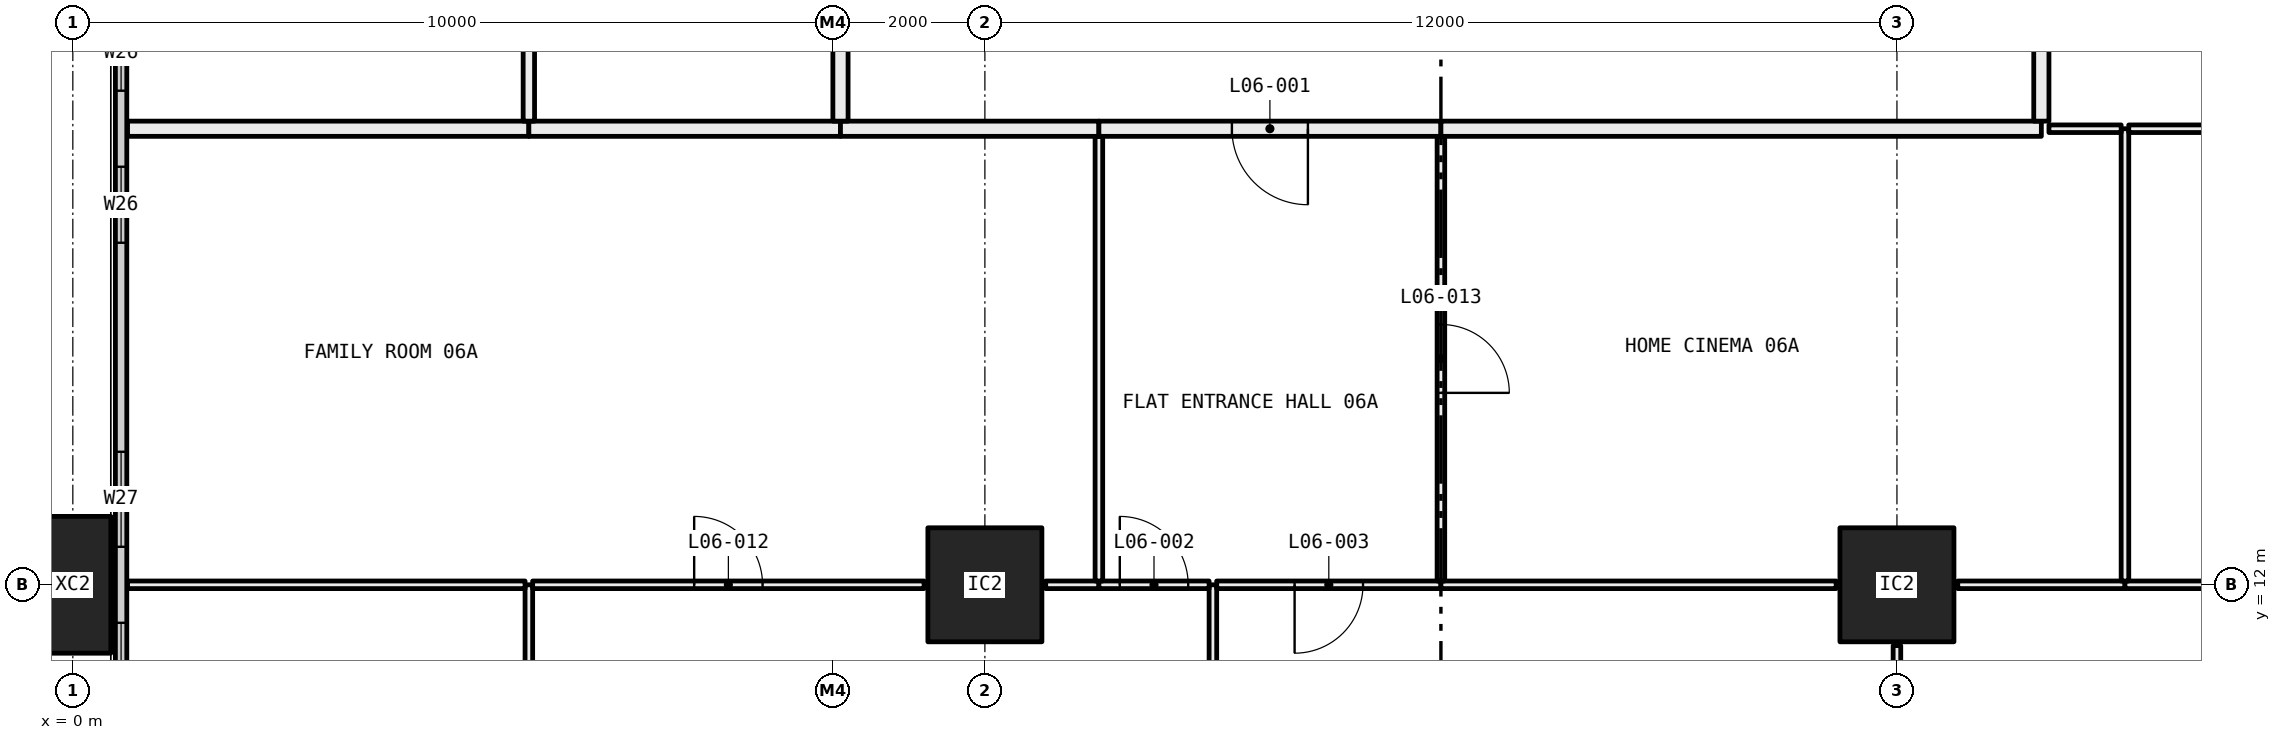
"""IFC4 building model, lengths in metres.
Left out: names, types, materials, properties, quantities, classifications, styles, units other than length and angle.
Written with IfcOpenShell. Run it as: python <this file> out.ifc"""

import sys

from ifc_helpers import new_model, si_unit, direction, frame, frame_2d, origin, origin_2d, place, context, subcontext, project, spatial, rectangle, hollow_rectangle, extrude, element, fill, save


model = new_model("IFC4")
c1 = context("Model", 3, precision=1e-05, world=origin(), true_north=direction((0.0, 1.0)))
c2 = subcontext(c1, "Body", "Model", "MODEL_VIEW")
j1 = project(units=[si_unit("LENGTHUNIT", "METRE"), si_unit("PLANEANGLEUNIT", "RADIAN")], contexts=[c1])
p1 = place(None, origin())
s1 = spatial("IfcSite", under=j1, at=p1, CompositionType="ELEMENT")
p2 = place(p1, origin())
s2 = spatial("IfcBuilding", under=s1, at=p2, CompositionType="ELEMENT")
p3 = place(p2, frame((0.0, 0.0, 33.45)))
s3 = spatial("IfcBuildingStorey", under=s2, at=p3, CompositionType="ELEMENT", Elevation=33.45)
p4 = place(p3, frame((0.0, 12.0, -0.4), z_axis=(0.0, 0.0, 1.0), x_axis=(0.0, 1.0, 0.0)))
e1 = element("IfcColumn", 1, at=p4, inside=s3, PredefinedType="COLUMN", context=c2, shape_type="SweptSolid", body=[
    extrude(hollow_rectangle(XDim=1.8, YDim=1.0, WallThickness=0.07, at=origin_2d()), origin(), (0.0, 0.0, 1.0), 3.45),
])
for number, where, z_axis, x_axis in (
    (2, (12.0, 12.0, 0.0), (0.0, 0.0, 1.0), (1.0, 0.0, 0.0)),
    (3, (24.0, 12.0, 0.0), (0.0, 0.0, 1.0), (1.0, 0.0, 0.0)),
):
    element("IfcColumn", number, at=place(p3, frame(where, z_axis=z_axis, x_axis=x_axis)), inside=s3, PredefinedType="COLUMN", context=c2, shape_type="SweptSolid", body=[
        extrude(hollow_rectangle(XDim=1.5, YDim=1.5, WallThickness=0.065, at=origin_2d()), origin(), (0.0, 0.0, 1.0), 3.05),
    ])
p5 = place(p3, frame((0.635, 6.71, 0.0), z_axis=(0.0, 0.0, 1.0), x_axis=(0.0, 1.0, 0.0)))
e4 = element("IfcWall", 4, at=p5, inside=s3, PredefinedType="ELEMENTEDWALL", context=c2, shape_type="SweptSolid", body=[
    extrude(rectangle(XDim=34.58, YDim=0.15, at=frame_2d((17.29, 0.0))), origin(), (0.0, 0.0, 1.0), 3.05),
])
p6 = place(p5, frame((0.29, 0.0, 0.45)))
e5 = element("IfcOpeningElement", 5, at=p6, cuts=e4, PredefinedType="OPENING", context=c2, shape_type="SweptSolid", body=[
    extrude(rectangle(XDim=4.5, YDim=2.55, at=frame_2d((2.25, 1.275))), frame((0.0, 0.085, 0.0), z_axis=(0.0, -1.0, 0.0), x_axis=(1.0, 0.0, 0.0)), (0.0, 0.0, 1.0), 0.17),
])
p7 = place(p5, frame((5.79, 0.0, 0.45)))
e6 = element("IfcOpeningElement", 6, at=p7, cuts=e4, PredefinedType="OPENING", context=c2, shape_type="SweptSolid", body=[
    extrude(rectangle(XDim=1.25, YDim=2.55, at=frame_2d((0.625, 1.275))), frame((0.0, 0.085, 0.0), z_axis=(0.0, -1.0, 0.0), x_axis=(1.0, 0.0, 0.0)), (0.0, 0.0, 1.0), 0.17),
])
p8 = place(p5, frame((9.79, 0.0, 0.45)))
e7 = element("IfcOpeningElement", 7, at=p8, cuts=e4, PredefinedType="OPENING", context=c2, shape_type="SweptSolid", body=[
    extrude(rectangle(XDim=1.0, YDim=2.55, at=frame_2d((0.5, 1.275))), frame((0.0, 0.085, 0.0), z_axis=(0.0, -1.0, 0.0), x_axis=(1.0, 0.0, 0.0)), (0.0, 0.0, 1.0), 0.17),
])
p9 = place(p5, frame((11.79, 0.0, 0.45)))
e8 = element("IfcOpeningElement", 8, at=p9, cuts=e4, PredefinedType="OPENING", context=c2, shape_type="SweptSolid", body=[
    extrude(rectangle(XDim=1.0, YDim=2.55, at=frame_2d((0.5, 1.275))), frame((0.0, 0.085, 0.0), z_axis=(0.0, -1.0, 0.0), x_axis=(1.0, 0.0, 0.0)), (0.0, 0.0, 1.0), 0.17),
])
p10 = place(p5, frame((15.54, 0.0, 0.45)))
e9 = element("IfcOpeningElement", 9, at=p10, cuts=e4, PredefinedType="OPENING", context=c2, shape_type="SweptSolid", body=[
    extrude(rectangle(XDim=1.25, YDim=2.55, at=frame_2d((0.625, 1.275))), frame((0.0, 0.085, 0.0), z_axis=(0.0, -1.0, 0.0), x_axis=(1.0, 0.0, 0.0)), (0.0, 0.0, 1.0), 0.17),
])
p11 = place(p5, frame((17.79, 0.0, 0.45)))
e10 = element("IfcOpeningElement", 10, at=p11, cuts=e4, PredefinedType="OPENING", context=c2, shape_type="SweptSolid", body=[
    extrude(rectangle(XDim=1.25, YDim=2.55, at=frame_2d((0.625, 1.275))), frame((0.0, 0.085, 0.0), z_axis=(0.0, -1.0, 0.0), x_axis=(1.0, 0.0, 0.0)), (0.0, 0.0, 1.0), 0.17),
])
p12 = place(p5, frame((21.79, 0.0, 0.45)))
e11 = element("IfcOpeningElement", 11, at=p12, cuts=e4, PredefinedType="OPENING", context=c2, shape_type="SweptSolid", body=[
    extrude(rectangle(XDim=1.0, YDim=2.55, at=frame_2d((0.5, 1.275))), frame((0.0, 0.085, 0.0), z_axis=(0.0, -1.0, 0.0), x_axis=(1.0, 0.0, 0.0)), (0.0, 0.0, 1.0), 0.17),
])
p13 = place(p5, frame((23.79, 0.0, 0.45)))
e12 = element("IfcOpeningElement", 12, at=p13, cuts=e4, PredefinedType="OPENING", context=c2, shape_type="SweptSolid", body=[
    extrude(rectangle(XDim=1.0, YDim=2.55, at=frame_2d((0.5, 1.275))), frame((0.0, 0.085, 0.0), z_axis=(0.0, -1.0, 0.0), x_axis=(1.0, 0.0, 0.0)), (0.0, 0.0, 1.0), 0.17),
])
p14 = place(p5, frame((27.54, 0.0, 0.45)))
e13 = element("IfcOpeningElement", 13, at=p14, cuts=e4, PredefinedType="OPENING", context=c2, shape_type="SweptSolid", body=[
    extrude(rectangle(XDim=1.25, YDim=2.55, at=frame_2d((0.625, 1.275))), frame((0.0, 0.085, 0.0), z_axis=(0.0, -1.0, 0.0), x_axis=(1.0, 0.0, 0.0)), (0.0, 0.0, 1.0), 0.17),
])
p15 = place(p5, frame((29.79, 0.0, 0.45)))
e14 = element("IfcOpeningElement", 14, at=p15, cuts=e4, PredefinedType="OPENING", context=c2, shape_type="SweptSolid", body=[
    extrude(rectangle(XDim=4.5, YDim=2.55, at=frame_2d((2.25, 1.275))), frame((0.0, 0.085, 0.0), z_axis=(0.0, -1.0, 0.0), x_axis=(1.0, 0.0, 0.0)), (0.0, 0.0, 1.0), 0.17),
])
p16 = place(p3, frame((6.0, 6.72, 0.0), z_axis=(0.0, 0.0, 1.0), x_axis=(0.0, 1.0, 0.0)))
e15 = element("IfcWall", 15, at=p16, inside=s3, PredefinedType="PARTITIONING", context=c2, shape_type="SweptSolid", body=[
    extrude(rectangle(XDim=5.28, YDim=0.1, at=frame_2d((2.64, 0.0))), origin(), (0.0, 0.0, 1.0), 2.45),
])
p17 = place(p16, frame((2.19, 0.0, 0.0)))
e16 = element("IfcOpeningElement", 16, at=p17, cuts=e15, PredefinedType="OPENING", context=c2, shape_type="SweptSolid", body=[
    extrude(rectangle(XDim=0.9, YDim=2.1, at=frame_2d((0.45, 1.05))), frame((0.0, 0.06, 0.0), z_axis=(0.0, -1.0, 0.0), x_axis=(1.0, 0.0, 0.0)), (0.0, 0.0, 1.0), 0.12),
])
p18 = place(p3, frame((5.95, 12.0, 0.0), z_axis=(0.0, 0.0, 1.0), x_axis=(-1.0, 0.0, 0.0)))
e17 = element("IfcWall", 17, at=p18, inside=s3, PredefinedType="PARTITIONING", context=c2, shape_type="SweptSolid", body=[
    extrude(rectangle(XDim=5.23, YDim=0.1, at=frame_2d((2.615, 0.0))), origin(), (0.0, 0.0, 1.0), 2.45),
])
p19 = place(p3, frame((15.0, 6.05, 0.0), z_axis=(0.0, 0.0, 1.0), x_axis=(0.0, 1.0, 0.0)))
e18 = element("IfcWall", 18, at=p19, inside=s3, PredefinedType="PARTITIONING", context=c2, shape_type="SweptSolid", body=[
    extrude(rectangle(XDim=5.95, YDim=0.1, at=frame_2d((2.975, 0.0))), origin(), (0.0, 0.0, 1.0), 2.45),
])
p20 = place(p3, frame((11.2, 12.0, 0.0), z_axis=(0.0, 0.0, 1.0), x_axis=(-1.0, 0.0, 0.0)))
e19 = element("IfcWall", 19, at=p20, inside=s3, PredefinedType="PARTITIONING", context=c2, shape_type="SweptSolid", body=[
    extrude(rectangle(XDim=5.15, YDim=0.1, at=frame_2d((2.575, 0.0))), origin(), (0.0, 0.0, 1.0), 2.45),
])
p21 = place(p20, frame((2.125, 0.0, 0.0)))
e20 = element("IfcOpeningElement", 20, at=p21, cuts=e19, PredefinedType="OPENING", context=c2, shape_type="SweptSolid", body=[
    extrude(rectangle(XDim=0.9, YDim=2.1, at=frame_2d((0.45, 1.05))), frame((0.0, 0.06, 0.0), z_axis=(0.0, -1.0, 0.0), x_axis=(1.0, 0.0, 0.0)), (0.0, 0.0, 1.0), 0.12),
])
p22 = place(p3, frame((13.5, 12.0, 0.0), z_axis=(0.0, 0.0, 1.0), x_axis=(-1.0, 0.0, 0.0)))
e21 = element("IfcWall", 21, at=p22, inside=s3, PredefinedType="PARTITIONING", context=c2, shape_type="SweptSolid", body=[
    extrude(rectangle(XDim=0.7, YDim=0.1, at=frame_2d((0.35, 0.0))), origin(), (0.0, 0.0, 1.0), 2.45),
])
p23 = place(p3, frame((14.95, 12.0, 0.0), z_axis=(0.0, 0.0, 1.0), x_axis=(-1.0, 0.0, 0.0)))
e22 = element("IfcWall", 22, at=p23, inside=s3, PredefinedType="PARTITIONING", context=c2, shape_type="SweptSolid", body=[
    extrude(rectangle(XDim=1.45, YDim=0.1, at=frame_2d((0.725, 0.0))), origin(), (0.0, 0.0, 1.0), 2.45),
])
p24 = place(p23, frame((0.275, 0.0, 0.0)))
e23 = element("IfcOpeningElement", 23, at=p24, cuts=e22, PredefinedType="OPENING", context=c2, shape_type="SweptSolid", body=[
    extrude(rectangle(XDim=0.9, YDim=2.1, at=frame_2d((0.45, 1.05))), frame((0.0, 0.06, 0.0), z_axis=(0.0, -1.0, 0.0), x_axis=(1.0, 0.0, 0.0)), (0.0, 0.0, 1.0), 0.12),
])
p25 = place(p3, frame((24.0, 6.05, 0.0), z_axis=(0.0, 0.0, 1.0), x_axis=(0.0, 1.0, 0.0)))
e24 = element("IfcWall", 24, at=p25, inside=s3, PredefinedType="PARTITIONING", context=c2, shape_type="SweptSolid", body=[
    extrude(rectangle(XDim=5.15, YDim=0.1, at=frame_2d((2.575, 0.0))), origin(), (0.0, 0.0, 1.0), 2.45),
])
p26 = place(p25, frame((2.125, 0.0, 0.0)))
e25 = element("IfcOpeningElement", 25, at=p26, cuts=e24, PredefinedType="OPENING", context=c2, shape_type="SweptSolid", body=[
    extrude(rectangle(XDim=0.9, YDim=2.1, at=frame_2d((0.45, 1.05))), frame((0.0, 0.06, 0.0), z_axis=(0.0, -1.0, 0.0), x_axis=(1.0, 0.0, 0.0)), (0.0, 0.0, 1.0), 0.12),
])
p27 = place(p3, frame((18.0, 12.0, 0.0), z_axis=(0.0, 0.0, 1.0), x_axis=(-1.0, 0.0, 0.0)))
e26 = element("IfcWall", 26, at=p27, inside=s3, PredefinedType="PARTITIONING", context=c2, shape_type="SweptSolid", body=[
    extrude(rectangle(XDim=2.95, YDim=0.1, at=frame_2d((1.475, 0.0))), origin(), (0.0, 0.0, 1.0), 2.45),
])
p28 = place(p27, frame((1.025, 0.0, 0.0)))
e27 = element("IfcOpeningElement", 27, at=p28, cuts=e26, PredefinedType="OPENING", context=c2, shape_type="SweptSolid", body=[
    extrude(rectangle(XDim=0.9, YDim=2.1, at=frame_2d((0.45, 1.05))), frame((0.0, 0.06, 0.0), z_axis=(0.0, -1.0, 0.0), x_axis=(1.0, 0.0, 0.0)), (0.0, 0.0, 1.0), 0.12),
])
p29 = place(p3, frame((23.2, 12.0, 0.0), z_axis=(0.0, 0.0, 1.0), x_axis=(-1.0, 0.0, 0.0)))
e28 = element("IfcWall", 28, at=p29, inside=s3, PredefinedType="PARTITIONING", context=c2, shape_type="SweptSolid", body=[
    extrude(rectangle(XDim=5.2, YDim=0.1, at=frame_2d((2.6, 0.0))), origin(), (0.0, 0.0, 1.0), 2.45),
])
p30 = place(p3, frame((27.0, 12.0, 0.0), z_axis=(0.0, 0.0, 1.0), x_axis=(-1.0, 0.0, 0.0)))
e29 = element("IfcWall", 29, at=p30, inside=s3, PredefinedType="PARTITIONING", context=c2, shape_type="SweptSolid", body=[
    extrude(rectangle(XDim=2.2, YDim=0.1, at=frame_2d((1.1, 0.0))), origin(), (0.0, 0.0, 1.0), 2.45),
])
p31 = place(p3, frame((32.95, 12.0, 0.0), z_axis=(0.0, 0.0, 1.0), x_axis=(-1.0, 0.0, 0.0)))
e30 = element("IfcWall", 30, at=p31, inside=s3, PredefinedType="PARTITIONING", context=c2, shape_type="SweptSolid", body=[
    extrude(rectangle(XDim=5.95, YDim=0.1, at=frame_2d((2.975, 0.0))), origin(), (0.0, 0.0, 1.0), 2.45),
])
p32 = place(p31, frame((2.525, 0.0, 0.0)))
e31 = element("IfcOpeningElement", 31, at=p32, cuts=e30, PredefinedType="OPENING", context=c2, shape_type="SweptSolid", body=[
    extrude(rectangle(XDim=0.9, YDim=2.1, at=frame_2d((0.45, 1.05))), frame((0.0, 0.06, 0.0), z_axis=(0.0, -1.0, 0.0), x_axis=(1.0, 0.0, 0.0)), (0.0, 0.0, 1.0), 0.12),
])
p33 = place(p3, frame((13.5, 12.05, 0.0), z_axis=(0.0, 0.0, 1.0), x_axis=(0.0, 1.0, 0.0)))
e32 = element("IfcWall", 32, at=p33, inside=s3, PredefinedType="PARTITIONING", context=c2, shape_type="SweptSolid", body=[
    extrude(rectangle(XDim=5.85, YDim=0.1, at=frame_2d((2.925, 0.0))), origin(), (0.0, 0.0, 1.0), 2.45),
])
p34 = place(p3, frame((6.0, 18.0, 0.0), z_axis=(0.0, 0.0, 1.0), x_axis=(-1.0, 0.0, 0.0)))
e33 = element("IfcWall", 33, at=p34, inside=s3, PredefinedType="PARTITIONING", context=c2, shape_type="SweptSolid", body=[
    extrude(rectangle(XDim=5.28, YDim=0.2, at=frame_2d((2.64, 0.0))), origin(), (0.0, 0.0, 1.0), 3.05),
])
p35 = place(p3, frame((10.1, 18.0, 0.0), z_axis=(0.0, 0.0, 1.0), x_axis=(-1.0, 0.0, 0.0)))
e34 = element("IfcWall", 34, at=p35, inside=s3, PredefinedType="PARTITIONING", context=c2, shape_type="SweptSolid", body=[
    extrude(rectangle(XDim=4.1, YDim=0.2, at=frame_2d((2.05, 0.0))), origin(), (0.0, 0.0, 1.0), 3.05),
])
p36 = place(p3, frame((13.5, 18.0, 0.0), z_axis=(0.0, 0.0, 1.0), x_axis=(-1.0, 0.0, 0.0)))
e35 = element("IfcWall", 35, at=p36, inside=s3, PredefinedType="PARTITIONING", context=c2, shape_type="SweptSolid", body=[
    extrude(rectangle(XDim=3.4, YDim=0.2, at=frame_2d((1.7, 0.0))), origin(), (0.0, 0.0, 1.0), 3.05),
])
p37 = place(p3, frame((18.0, 12.05, 0.0), z_axis=(0.0, 0.0, 1.0), x_axis=(0.0, 1.0, 0.0)))
e36 = element("IfcWall", 36, at=p37, inside=s3, PredefinedType="PARTITIONING", context=c2, shape_type="SweptSolid", body=[
    extrude(rectangle(XDim=5.85, YDim=0.1, at=frame_2d((2.925, 0.0))), origin(), (0.0, 0.0, 1.0), 2.45),
])
p38 = place(p37, frame((2.475, 0.0, 0.0)))
e37 = element("IfcOpeningElement", 37, at=p38, cuts=e36, PredefinedType="OPENING", context=c2, shape_type="SweptSolid", body=[
    extrude(rectangle(XDim=0.9, YDim=2.1, at=frame_2d((0.45, 1.05))), frame((0.0, 0.06, 0.0), z_axis=(0.0, -1.0, 0.0), x_axis=(1.0, 0.0, 0.0)), (0.0, 0.0, 1.0), 0.12),
])
p39 = place(p3, frame((18.0, 18.0, 0.0), z_axis=(0.0, 0.0, 1.0), x_axis=(-1.0, 0.0, 0.0)))
e38 = element("IfcWall", 38, at=p39, inside=s3, PredefinedType="PARTITIONING", context=c2, shape_type="SweptSolid", body=[
    extrude(rectangle(XDim=4.5, YDim=0.2, at=frame_2d((2.25, 0.0))), origin(), (0.0, 0.0, 1.0), 3.05),
])
p40 = place(p39, frame((1.75, 0.0, 0.0)))
e39 = element("IfcOpeningElement", 39, at=p40, cuts=e38, PredefinedType="OPENING", context=c2, shape_type="SweptSolid", body=[
    extrude(rectangle(XDim=1.0, YDim=2.1, at=frame_2d((0.5, 1.05))), frame((0.0, 0.11, 0.0), z_axis=(0.0, -1.0, 0.0), x_axis=(1.0, 0.0, 0.0)), (0.0, 0.0, 1.0), 0.22),
])
p41 = place(p3, frame((27.0, 12.05, 0.0), z_axis=(0.0, 0.0, 1.0), x_axis=(0.0, 1.0, 0.0)))
e40 = element("IfcWall", 40, at=p41, inside=s3, PredefinedType="PARTITIONING", context=c2, shape_type="SweptSolid", body=[
    extrude(rectangle(XDim=5.95, YDim=0.1, at=frame_2d((2.975, 0.0))), origin(), (0.0, 0.0, 1.0), 2.45),
])
p42 = place(p3, frame((26.95, 18.0, 0.0), z_axis=(0.0, 0.0, 1.0), x_axis=(-1.0, 0.0, 0.0)))
e41 = element("IfcWall", 41, at=p42, inside=s3, PredefinedType="PARTITIONING", context=c2, shape_type="SweptSolid", body=[
    extrude(rectangle(XDim=0.95, YDim=0.1, at=frame_2d((0.475, 0.0))), origin(), (0.0, 0.0, 1.0), 3.05),
])
p43 = place(p3, frame((25.9, 18.0, 0.0), z_axis=(0.0, 0.0, 1.0), x_axis=(-1.0, 0.0, 0.0)))
e42 = element("IfcWall", 42, at=p43, inside=s3, PredefinedType="PARTITIONING", context=c2, shape_type="SweptSolid", body=[
    extrude(rectangle(XDim=7.9, YDim=0.2, at=frame_2d((3.95, 0.0))), origin(), (0.0, 0.0, 1.0), 3.05),
])
p44 = place(p3, frame((31.5, 18.0, 0.0), z_axis=(0.0, 0.0, 1.0), x_axis=(-1.0, 0.0, 0.0)))
e43 = element("IfcWall", 43, at=p44, inside=s3, PredefinedType="PARTITIONING", context=c2, shape_type="SweptSolid", body=[
    extrude(rectangle(XDim=4.45, YDim=0.1, at=frame_2d((2.225, 0.0))), origin(), (0.0, 0.0, 1.0), 3.05),
])
p45 = place(p44, frame((1.775, 0.0, 0.0)))
e44 = element("IfcOpeningElement", 44, at=p45, cuts=e43, PredefinedType="OPENING", context=c2, shape_type="SweptSolid", body=[
    extrude(rectangle(XDim=0.9, YDim=2.1, at=frame_2d((0.45, 1.05))), frame((0.0, 0.06, 0.0), z_axis=(0.0, -1.0, 0.0), x_axis=(1.0, 0.0, 0.0)), (0.0, 0.0, 1.0), 0.12),
])
p46 = place(p3, frame((25.9, 23.9, 0.0), z_axis=(0.0, 0.0, 1.0), x_axis=(0.0, -1.0, 0.0)))
e45 = element("IfcWall", 45, at=p46, inside=s3, PredefinedType="PARTITIONING", context=c2, shape_type="SweptSolid", body=[
    extrude(rectangle(XDim=5.8, YDim=0.2, at=frame_2d((2.9, 0.0))), origin(), (0.0, 0.0, 1.0), 3.05),
])
p47 = place(p3, frame((6.0, 18.1, 0.0), z_axis=(0.0, 0.0, 1.0), x_axis=(0.0, 1.0, 0.0)))
e46 = element("IfcWall", 46, at=p47, inside=s3, PredefinedType="PARTITIONING", context=c2, shape_type="SweptSolid", body=[
    extrude(rectangle(XDim=4.4, YDim=0.15, at=frame_2d((2.2, 0.0))), origin(), (0.0, 0.0, 1.0), 3.05),
])
p48 = place(p47, frame((1.75, 0.0, 0.0)))
e47 = element("IfcOpeningElement", 47, at=p48, cuts=e46, PredefinedType="OPENING", context=c2, shape_type="SweptSolid", body=[
    extrude(rectangle(XDim=0.9, YDim=2.1, at=frame_2d((0.45, 1.05))), frame((0.0, 0.085, 0.0), z_axis=(0.0, -1.0, 0.0), x_axis=(1.0, 0.0, 0.0)), (0.0, 0.0, 1.0), 0.17),
])
p49 = place(p3, frame((10.1, 18.1, 0.0), z_axis=(0.0, 0.0, 1.0), x_axis=(0.0, 1.0, 0.0)))
e48 = element("IfcWall", 48, at=p49, inside=s3, PredefinedType="PARTITIONING", context=c2, shape_type="SweptSolid", body=[
    extrude(rectangle(XDim=4.4, YDim=0.2, at=frame_2d((2.2, 0.0))), origin(), (0.0, 0.0, 1.0), 3.05),
])
p50 = place(p6, origin())
e49 = element("IfcWindow", 49, at=p50, inside=s3, PartitioningType="SINGLE_PANEL", PredefinedType="WINDOW", context=c2, shape_type="SweptSolid", body=[
    extrude(rectangle(XDim=4.5, YDim=2.55, at=frame_2d((2.25, 1.275))), frame((0.0, 0.03, 0.0), z_axis=(0.0, -1.0, 0.0), x_axis=(1.0, 0.0, 0.0)), (0.0, 0.0, 1.0), 0.06),
])
fill(e5, e49)
p51 = place(p7, origin())
e50 = element("IfcWindow", 50, at=p51, inside=s3, PartitioningType="SINGLE_PANEL", PredefinedType="WINDOW", context=c2, shape_type="SweptSolid", body=[
    extrude(rectangle(XDim=1.25, YDim=2.55, at=frame_2d((0.625, 1.275))), frame((0.0, 0.03, 0.0), z_axis=(0.0, -1.0, 0.0), x_axis=(1.0, 0.0, 0.0)), (0.0, 0.0, 1.0), 0.06),
])
fill(e6, e50)
p52 = place(p8, origin())
e51 = element("IfcWindow", 51, at=p52, inside=s3, PartitioningType="SINGLE_PANEL", PredefinedType="WINDOW", context=c2, shape_type="SweptSolid", body=[
    extrude(rectangle(XDim=1.0, YDim=2.55, at=frame_2d((0.5, 1.275))), frame((0.0, 0.03, 0.0), z_axis=(0.0, -1.0, 0.0), x_axis=(1.0, 0.0, 0.0)), (0.0, 0.0, 1.0), 0.06),
])
fill(e7, e51)
p53 = place(p9, origin())
e52 = element("IfcWindow", 52, at=p53, inside=s3, PartitioningType="SINGLE_PANEL", PredefinedType="WINDOW", context=c2, shape_type="SweptSolid", body=[
    extrude(rectangle(XDim=1.0, YDim=2.55, at=frame_2d((0.5, 1.275))), frame((0.0, 0.03, 0.0), z_axis=(0.0, -1.0, 0.0), x_axis=(1.0, 0.0, 0.0)), (0.0, 0.0, 1.0), 0.06),
])
fill(e8, e52)
p54 = place(p40, origin())
e53 = element("IfcDoor", 53, at=p54, inside=s3, OperationType="SINGLE_SWING_RIGHT", PredefinedType="DOOR", context=c2, shape_type="SweptSolid", body=[
    extrude(rectangle(XDim=1.0, YDim=2.1, at=frame_2d((0.5, 1.05))), frame((0.0, 0.025, 0.0), z_axis=(0.0, -1.0, 0.0), x_axis=(1.0, 0.0, 0.0)), (0.0, 0.0, 1.0), 0.05),
])
fill(e39, e53)
p55 = place(p24, frame((0.9, 0.0, 0.0), x_axis=(-1.0, 0.0, 0.0)))
e54 = element("IfcDoor", 54, at=p55, inside=s3, OperationType="SINGLE_SWING_RIGHT", PredefinedType="DOOR", context=c2, shape_type="SweptSolid", body=[
    extrude(rectangle(XDim=0.9, YDim=2.1, at=frame_2d((0.45, 1.05))), frame((0.0, 0.025, 0.0), z_axis=(0.0, -1.0, 0.0), x_axis=(1.0, 0.0, 0.0)), (0.0, 0.0, 1.0), 0.05),
])
fill(e23, e54)
p56 = place(p28, origin())
e55 = element("IfcDoor", 55, at=p56, inside=s3, OperationType="SINGLE_SWING_LEFT", PredefinedType="DOOR", context=c2, shape_type="SweptSolid", body=[
    extrude(rectangle(XDim=0.9, YDim=2.1, at=frame_2d((0.45, 1.05))), frame((0.0, 0.025, 0.0), z_axis=(0.0, -1.0, 0.0), x_axis=(1.0, 0.0, 0.0)), (0.0, 0.0, 1.0), 0.05),
])
fill(e27, e55)
p57 = place(p21, frame((0.9, 0.0, 0.0), x_axis=(-1.0, 0.0, 0.0)))
e56 = element("IfcDoor", 56, at=p57, inside=s3, OperationType="SINGLE_SWING_RIGHT", PredefinedType="DOOR", context=c2, shape_type="SweptSolid", body=[
    extrude(rectangle(XDim=0.9, YDim=2.1, at=frame_2d((0.45, 1.05))), frame((0.0, 0.025, 0.0), z_axis=(0.0, -1.0, 0.0), x_axis=(1.0, 0.0, 0.0)), (0.0, 0.0, 1.0), 0.05),
])
fill(e20, e56)
p58 = place(p38, frame((0.9, 0.0, 0.0), x_axis=(-1.0, 0.0, 0.0)))
e57 = element("IfcDoor", 57, at=p58, inside=s3, OperationType="SINGLE_SWING_LEFT", PredefinedType="DOOR", context=c2, shape_type="SweptSolid", body=[
    extrude(rectangle(XDim=0.9, YDim=2.1, at=frame_2d((0.45, 1.05))), frame((0.0, 0.025, 0.0), z_axis=(0.0, -1.0, 0.0), x_axis=(1.0, 0.0, 0.0)), (0.0, 0.0, 1.0), 0.05),
])
fill(e37, e57)
save(model, sys.argv[1])
